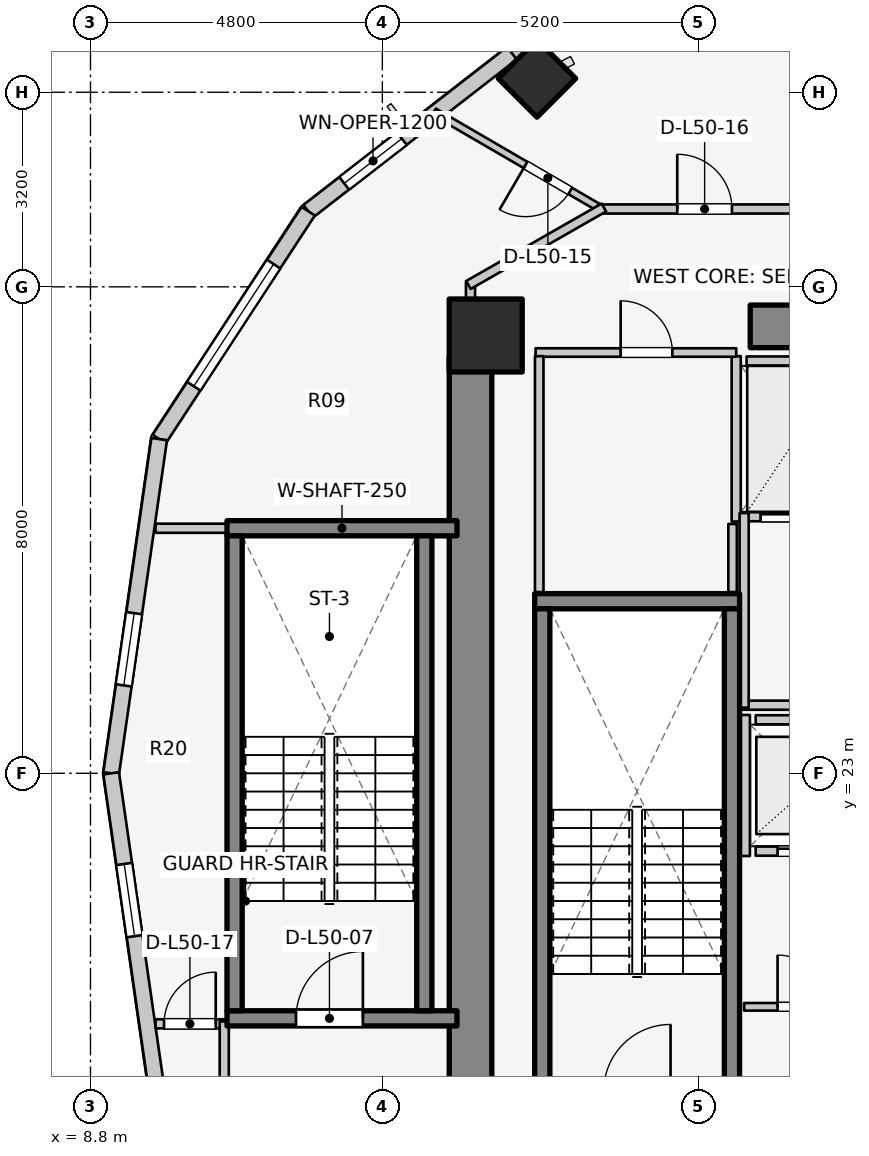
"""IFC4 building model, lengths in metres.
Left out: names, types, materials, properties, quantities, classifications, styles, units other than length and angle.
Written with IfcOpenShell. Run it as: python <this file> out.ifc"""

import sys

from ifc_helpers import new_model, si_unit, direction, frame, frame_2d, origin, origin_2d, place, context, subcontext, project, spatial, rectangle, extrude, element, fill, save


model = new_model("IFC4")
c1 = context("Model", 3, precision=1e-05, world=origin(), true_north=direction((0.0, 1.0)))
c2 = subcontext(c1, "Body", "Model", "MODEL_VIEW")
j1 = project(units=[si_unit("LENGTHUNIT", "METRE"), si_unit("PLANEANGLEUNIT", "RADIAN")], contexts=[c1])
p1 = place(None, origin())
s1 = spatial("IfcSite", under=j1, at=p1, CompositionType="ELEMENT")
p2 = place(p1, origin())
s2 = spatial("IfcBuilding", under=s1, at=p2, CompositionType="ELEMENT")
p3 = place(p2, frame((0.0, 0.0, 165.3)))
s3 = spatial("IfcBuildingStorey", under=s2, at=p3, CompositionType="ELEMENT", Elevation=165.3)
p4 = place(p3, frame((15.05, 17.05, 0.0), z_axis=(0.0, 0.0, 1.0), x_axis=(0.0, 1.0, 0.0)))
e1 = element("IfcWall", 1, at=p4, inside=s3, PredefinedType="SHEAR", context=c2, shape_type="SweptSolid", body=[
    extrude(rectangle(XDim=12.8, YDim=0.7, at=frame_2d((6.4, 0.0))), origin(), (0.0, 0.0, 1.0), 3.1),
])
p5 = place(p3, frame((19.65, 30.35, 0.0), z_axis=(0.0, 0.0, 1.0), x_axis=(1.0, 0.0, 0.0)))
e2 = element("IfcWall", 2, at=p5, inside=s3, PredefinedType="SHEAR", context=c2, shape_type="SweptSolid", body=[
    extrude(rectangle(XDim=4.5, YDim=0.7, at=frame_2d((2.25, 0.0))), origin(), (0.0, 0.0, 1.0), 3.1),
])
p6 = place(p3, frame((16.105, 25.83, 0.0), z_axis=(0.0, 0.0, 1.0), x_axis=(1.0, 0.0, 0.0)))
e3 = element("IfcWall", 3, at=p6, inside=s3, PredefinedType="SOLIDWALL", context=c2, shape_type="SweptSolid", body=[
    extrude(rectangle(XDim=3.37, YDim=0.25, at=frame_2d((1.685, 0.0))), origin(), (0.0, 0.0, 1.0), 3.1),
])
for number, where, z_axis, x_axis in (
    (4, (16.23, 17.895, 0.0), (0.0, 0.0, 1.0), (0.0, 1.0, 0.0)),
    (5, (19.35, 17.895, 0.0), (0.0, 0.0, 1.0), (0.0, 1.0, 0.0)),
):
    element("IfcWall", number, at=place(p3, frame(where, z_axis=z_axis, x_axis=x_axis)), inside=s3, PredefinedType="SOLIDWALL", context=c2, shape_type="SweptSolid", body=[
        extrude(rectangle(XDim=7.81, YDim=0.25, at=frame_2d((3.905, 0.0))), origin(), (0.0, 0.0, 1.0), 3.1),
    ])
p7 = place(p3, frame((11.045, 18.97, 0.0), z_axis=(0.0, 0.0, 1.0), x_axis=(1.0, 0.0, 0.0)))
e6 = element("IfcWall", 6, at=p7, inside=s3, PredefinedType="SOLIDWALL", context=c2, shape_type="SweptSolid", body=[
    extrude(rectangle(XDim=3.782, YDim=0.25, at=frame_2d((1.891, 0.0))), origin(), (0.0, 0.0, 1.0), 3.1),
])
p8 = place(p7, frame((1.135, 0.0, 0.0)))
e7 = element("IfcOpeningElement", 7, at=p8, cuts=e6, PredefinedType="OPENING", context=c2, shape_type="SweptSolid", body=[
    extrude(rectangle(XDim=1.1, YDim=2.1, at=frame_2d((0.55, 1.05))), frame((0.0, 0.135, 0.0), z_axis=(0.0, -1.0, 0.0), x_axis=(1.0, 0.0, 0.0)), (0.0, 0.0, 1.0), 0.27),
])
p9 = place(p3, frame((11.045, 27.03, 0.0), z_axis=(0.0, 0.0, 1.0), x_axis=(1.0, 0.0, 0.0)))
e8 = element("IfcWall", 8, at=p9, inside=s3, PredefinedType="SOLIDWALL", context=c2, shape_type="SweptSolid", body=[
    extrude(rectangle(XDim=3.782, YDim=0.25, at=frame_2d((1.891, 0.0))), origin(), (0.0, 0.0, 1.0), 3.1),
])
for number, where, z_axis, x_axis in (
    (9, (11.17, 19.095, 0.0), (0.0, 0.0, 1.0), (0.0, 1.0, 0.0)),
    (10, (14.29, 19.095, 0.0), (0.0, 0.0, 1.0), (0.0, 1.0, 0.0)),
):
    element("IfcWall", number, at=place(p3, frame(where, z_axis=z_axis, x_axis=x_axis)), inside=s3, PredefinedType="SOLIDWALL", context=c2, shape_type="SweptSolid", body=[
        extrude(rectangle(XDim=7.81, YDim=0.25, at=frame_2d((3.905, 0.0))), origin(), (0.0, 0.0, 1.0), 3.1),
    ])
p10 = place(p3, frame((15.3, 30.2, 0.0), z_axis=(0.0, 0.0, 1.0), x_axis=(1.0, 0.0, 0.0)))
e11 = element("IfcColumn", 11, at=p10, inside=s3, PredefinedType="COLUMN", context=c2, shape_type="SweptSolid", body=[
    extrude(rectangle(XDim=1.2, YDim=1.2, at=origin_2d()), origin(), (0.0, 0.0, 1.0), 3.1),
])
p11 = place(p3, frame((16.143, 34.427, 0.0), z_axis=(0.0, 0.0, 1.0), x_axis=(-0.707106781187, 0.707106781187, 0.0)))
e12 = element("IfcColumn", 12, at=p11, inside=s3, PredefinedType="COLUMN", context=c2, shape_type="SweptSolid", body=[
    extrude(rectangle(XDim=0.9, YDim=0.9, at=origin_2d()), origin(), (0.0, 0.0, 1.0), 3.1),
])
p12 = place(p3, frame((19.587, 36.863, 0.0), z_axis=(0.0, 0.0, 1.0), x_axis=(-0.885660265226, -0.464333818065, 0.0)))
e13 = element("IfcWall", 13, at=p12, inside=s3, PredefinedType="STANDARD", context=c2, shape_type="SweptSolid", body=[
    extrude(rectangle(XDim=4.354, YDim=0.26, at=frame_2d((2.177, 0.0))), origin(), (0.0, 0.0, 1.0), 2.85),
])
p13 = place(p3, frame((15.731, 34.842, 0.0), z_axis=(0.0, 0.0, 1.0), x_axis=(-0.790185650662, -0.612867552973, 0.0)))
e14 = element("IfcWall", 14, at=p13, inside=s3, PredefinedType="STANDARD", context=c2, shape_type="SweptSolid", body=[
    extrude(rectangle(XDim=4.239, YDim=0.26, at=frame_2d((2.12, 0.0))), origin(), (0.0, 0.0, 1.0), 2.85),
])
p14 = place(p13, frame((2.29, 0.0, 0.75)))
e15 = element("IfcOpeningElement", 15, at=p14, cuts=e14, PredefinedType="OPENING", context=c2, shape_type="SweptSolid", body=[
    extrude(rectangle(XDim=1.2, YDim=1.5, at=frame_2d((0.6, 0.75))), frame((0.0, 0.14, 0.0), z_axis=(0.0, -1.0, 0.0), x_axis=(1.0, 0.0, 0.0)), (0.0, 0.0, 1.0), 0.28),
])
p15 = place(p3, frame((12.381, 32.243, 0.0), z_axis=(0.0, 0.0, 1.0), x_axis=(-0.547456494366, -0.836834145322, 0.0)))
e16 = element("IfcWall", 16, at=p15, inside=s3, PredefinedType="STANDARD", context=c2, shape_type="SweptSolid", body=[
    extrude(rectangle(XDim=4.477, YDim=0.26, at=frame_2d((2.239, 0.0))), origin(), (0.0, 0.0, 1.0), 2.85),
])
p16 = place(p15, frame((1.039, 0.0, 0.75)))
e17 = element("IfcOpeningElement", 17, at=p16, cuts=e16, PredefinedType="OPENING", context=c2, shape_type="SweptSolid", body=[
    extrude(rectangle(XDim=2.4, YDim=1.7, at=frame_2d((1.2, 0.85))), frame((0.0, 0.14, 0.0), z_axis=(0.0, -1.0, 0.0), x_axis=(1.0, 0.0, 0.0)), (0.0, 0.0, 1.0), 0.28),
])
p17 = place(p3, frame((9.93, 28.497, 0.0), z_axis=(0.0, 0.0, 1.0), x_axis=(-0.142227632286, -0.989833976288, 0.0)))
e18 = element("IfcWall", 18, at=p17, inside=s3, PredefinedType="STANDARD", context=c2, shape_type="SweptSolid", body=[
    extrude(rectangle(XDim=5.553, YDim=0.26, at=frame_2d((2.776, 0.0))), origin(), (0.0, 0.0, 1.0), 2.85),
])
p18 = place(p17, frame((2.892, 0.0, 0.75)))
e19 = element("IfcOpeningElement", 19, at=p18, cuts=e18, PredefinedType="OPENING", context=c2, shape_type="SweptSolid", body=[
    extrude(rectangle(XDim=1.2, YDim=1.5, at=frame_2d((0.6, 0.75))), frame((0.0, 0.14, 0.0), z_axis=(0.0, -1.0, 0.0), x_axis=(1.0, 0.0, 0.0)), (0.0, 0.0, 1.0), 0.28),
])
p19 = place(p3, frame((9.14, 23.0, 0.0), z_axis=(0.0, 0.0, 1.0), x_axis=(0.142227632286, -0.989833976288, 0.0)))
e20 = element("IfcWall", 20, at=p19, inside=s3, PredefinedType="STANDARD", context=c2, shape_type="SweptSolid", body=[
    extrude(rectangle(XDim=5.553, YDim=0.26, at=frame_2d((2.776, 0.0))), origin(), (0.0, 0.0, 1.0), 2.85),
])
p20 = place(p19, frame((1.506, 0.0, 0.75)))
e21 = element("IfcOpeningElement", 21, at=p20, cuts=e20, PredefinedType="OPENING", context=c2, shape_type="SweptSolid", body=[
    extrude(rectangle(XDim=1.2, YDim=1.5, at=frame_2d((0.6, 0.75))), frame((0.0, 0.14, 0.0), z_axis=(0.0, -1.0, 0.0), x_axis=(1.0, 0.0, 0.0)), (0.0, 0.0, 1.0), 0.28),
])
p21 = place(p3, frame((19.74, 21.72, 0.0), z_axis=(0.0, 0.0, 1.0), x_axis=(1.0, 0.0, 0.0)))
e22 = element("IfcWall", 22, at=p21, inside=s3, PredefinedType="SOLIDWALL", context=c2, shape_type="SweptSolid", body=[
    extrude(rectangle(XDim=1.82, YDim=0.15, at=frame_2d((0.91, 0.0))), origin(), (0.0, 0.0, 1.0), 2.855),
])
p22 = place(p21, frame((0.36, 0.0, 0.0)))
e23 = element("IfcOpeningElement", 23, at=p22, cuts=e22, PredefinedType="OPENING", context=c2, shape_type="SweptSolid", body=[
    extrude(rectangle(XDim=1.1, YDim=2.1, at=frame_2d((0.55, 1.05))), frame((0.0, 0.085, 0.0), z_axis=(0.0, -1.0, 0.0), x_axis=(1.0, 0.0, 0.0)), (0.0, 0.0, 1.0), 0.17),
])
p23 = place(p3, frame((19.74, 23.88, 0.0), z_axis=(0.0, 0.0, 1.0), x_axis=(1.0, 0.0, 0.0)))
e24 = element("IfcWall", 24, at=p23, inside=s3, PredefinedType="SOLIDWALL", context=c2, shape_type="SweptSolid", body=[
    extrude(rectangle(XDim=1.82, YDim=0.15, at=frame_2d((0.91, 0.0))), origin(), (0.0, 0.0, 1.0), 2.855),
])
p24 = place(p3, frame((19.57, 21.64, 0.0), z_axis=(0.0, 0.0, 1.0), x_axis=(0.0, 1.0, 0.0)))
e25 = element("IfcWall", 25, at=p24, inside=s3, PredefinedType="SOLIDWALL", context=c2, shape_type="SweptSolid", body=[
    extrude(rectangle(XDim=2.32, YDim=0.15, at=frame_2d((1.16, 0.0))), origin(), (0.0, 0.0, 1.0), 2.855),
])
p25 = place(p3, frame((19.59, 27.22, 0.0), z_axis=(0.0, 0.0, 1.0), x_axis=(1.0, 0.0, 0.0)))
e26 = element("IfcWall", 26, at=p25, inside=s3, PredefinedType="SOLIDWALL", context=c2, shape_type="SweptSolid", body=[
    extrude(rectangle(XDim=1.76, YDim=0.15, at=frame_2d((0.88, 0.0))), origin(), (0.0, 0.0, 1.0), 2.855),
])
p26 = place(p25, frame((0.23, 0.0, 0.0)))
e27 = element("IfcOpeningElement", 27, at=p26, cuts=e26, PredefinedType="OPENING", context=c2, shape_type="SweptSolid", body=[
    extrude(rectangle(XDim=1.3, YDim=2.1, at=frame_2d((0.65, 1.05))), frame((0.0, 0.085, 0.0), z_axis=(0.0, -1.0, 0.0), x_axis=(1.0, 0.0, 0.0)), (0.0, 0.0, 1.0), 0.17),
])
p27 = place(p3, frame((19.59, 29.78, 0.0), z_axis=(0.0, 0.0, 1.0), x_axis=(1.0, 0.0, 0.0)))
e28 = element("IfcWall", 28, at=p27, inside=s3, PredefinedType="SOLIDWALL", context=c2, shape_type="SweptSolid", body=[
    extrude(rectangle(XDim=1.76, YDim=0.15, at=frame_2d((0.88, 0.0))), origin(), (0.0, 0.0, 1.0), 2.855),
])
p28 = place(p3, frame((19.42, 27.14, 0.0), z_axis=(0.0, 0.0, 1.0), x_axis=(0.0, 1.0, 0.0)))
e29 = element("IfcWall", 29, at=p28, inside=s3, PredefinedType="SOLIDWALL", context=c2, shape_type="SweptSolid", body=[
    extrude(rectangle(XDim=2.72, YDim=0.15, at=frame_2d((1.36, 0.0))), origin(), (0.0, 0.0, 1.0), 2.855),
])
p29 = place(p3, frame((19.52, 24.12, 0.0), z_axis=(0.0, 0.0, 1.0), x_axis=(1.0, 0.0, 0.0)))
e30 = element("IfcWall", 30, at=p29, inside=s3, PredefinedType="PARTITIONING", context=c2, shape_type="SweptSolid", body=[
    extrude(rectangle(XDim=5.08, YDim=0.15, at=frame_2d((2.54, 0.0))), origin(), (0.0, 0.0, 1.0), 2.12),
])
p30 = place(p3, frame((19.55, 24.08, 0.0), z_axis=(0.0, 0.0, 1.0), x_axis=(0.0, 1.0, 0.0)))
e31 = element("IfcWall", 31, at=p30, inside=s3, PredefinedType="PARTITIONING", context=c2, shape_type="SweptSolid", body=[
    extrude(rectangle(XDim=3.2, YDim=0.15, at=frame_2d((1.6, 0.0))), origin(), (0.0, 0.0, 1.0), 2.855),
])
p31 = place(p3, frame((19.55, 19.16, 0.0), z_axis=(0.0, 0.0, 1.0), x_axis=(1.0, 0.0, 0.0)))
e32 = element("IfcWall", 32, at=p31, inside=s3, PredefinedType="PARTITIONING", context=c2, shape_type="SweptSolid", body=[
    extrude(rectangle(XDim=4.87, YDim=0.125, at=frame_2d((2.435, 0.0))), origin(), (0.0, 0.0, 1.0), 2.12),
])
p32 = place(p31, frame((0.55, 0.0, 0.0)))
e33 = element("IfcOpeningElement", 33, at=p32, cuts=e32, PredefinedType="OPENING", context=c2, shape_type="SweptSolid", body=[
    extrude(rectangle(XDim=0.85, YDim=2.05, at=frame_2d((0.425, 1.025))), frame((0.0, 0.073, 0.0), z_axis=(0.0, -1.0, 0.0), x_axis=(1.0, 0.0, 0.0)), (0.0, 0.0, 1.0), 0.145),
])
p33 = place(p3, frame((16.12, 29.92, 0.0), z_axis=(0.0, 0.0, 1.0), x_axis=(1.0, 0.0, 0.0)))
e34 = element("IfcWall", 34, at=p33, inside=s3, PredefinedType="PLUMBINGWALL", context=c2, shape_type="SweptSolid", body=[
    extrude(rectangle(XDim=3.3, YDim=0.14, at=frame_2d((1.65, 0.0))), origin(), (0.0, 0.0, 1.0), 2.855),
])
p34 = place(p33, frame((1.399, 0.0, 0.0)))
e35 = element("IfcOpeningElement", 35, at=p34, cuts=e34, PredefinedType="OPENING", context=c2, shape_type="SweptSolid", body=[
    extrude(rectangle(XDim=0.85, YDim=2.05, at=frame_2d((0.425, 1.025))), frame((0.0, 0.08, 0.0), z_axis=(0.0, -1.0, 0.0), x_axis=(1.0, 0.0, 0.0)), (0.0, 0.0, 1.0), 0.16),
])
p35 = place(p3, frame((16.18, 25.98, 0.0), z_axis=(0.0, 0.0, 1.0), x_axis=(0.0, 1.0, 0.0)))
e36 = element("IfcWall", 36, at=p35, inside=s3, PredefinedType="PLUMBINGWALL", context=c2, shape_type="SweptSolid", body=[
    extrude(rectangle(XDim=3.88, YDim=0.14, at=frame_2d((1.94, 0.0))), origin(), (0.0, 0.0, 1.0), 2.855),
])
p36 = place(p3, frame((19.36, 25.98, 0.0), z_axis=(0.0, 0.0, 1.0), x_axis=(0.0, 1.0, 0.0)))
e37 = element("IfcWall", 37, at=p36, inside=s3, PredefinedType="PLUMBINGWALL", context=c2, shape_type="SweptSolid", body=[
    extrude(rectangle(XDim=1.12, YDim=0.14, at=frame_2d((0.56, 0.0))), origin(), (0.0, 0.0, 1.0), 2.855),
])
p37 = place(p3, frame((9.87, 27.03, 0.0), z_axis=(0.0, 0.0, 1.0), x_axis=(1.0, 0.0, 0.0)))
e38 = element("IfcWall", 38, at=p37, inside=s3, PredefinedType="PARTITIONING", context=c2, shape_type="SweptSolid", body=[
    extrude(rectangle(XDim=1.17, YDim=0.15, at=frame_2d((0.585, 0.0))), origin(), (0.0, 0.0, 1.0), 2.855),
])
p38 = place(p3, frame((15.05, 29.8, 0.0), z_axis=(0.0, 0.0, 1.0), x_axis=(0.0, 1.0, 0.0)))
e39 = element("IfcWall", 39, at=p38, inside=s3, PredefinedType="PARTITIONING", context=c2, shape_type="SweptSolid", body=[
    extrude(rectangle(XDim=1.29, YDim=0.15, at=frame_2d((0.645, 0.0))), origin(), (0.0, 0.0, 1.0), 2.855),
])
p39 = place(p3, frame((17.243, 32.255, 0.0), z_axis=(0.0, 0.0, 1.0), x_axis=(-0.864408655832, 0.502789892224, 0.0)))
e40 = element("IfcWall", 40, at=p39, inside=s3, PredefinedType="MOVABLE", context=c2, shape_type="SweptSolid", body=[
    extrude(rectangle(XDim=3.23, YDim=0.12, at=frame_2d((1.615, 0.0))), origin(), (0.0, 0.0, 1.0), 2.22),
])
p40 = place(p39, frame((0.641, 0.0, 0.0)))
e41 = element("IfcOpeningElement", 41, at=p40, cuts=e40, PredefinedType="OPENING", context=c2, shape_type="SweptSolid", body=[
    extrude(rectangle(XDim=0.85, YDim=2.05, at=frame_2d((0.425, 1.025))), frame((0.0, 0.07, 0.0), z_axis=(0.0, -1.0, 0.0), x_axis=(1.0, 0.0, 0.0)), (0.0, 0.0, 1.0), 0.14),
])
p41 = place(p3, frame((17.15, 32.28, 0.0), z_axis=(0.0, 0.0, 1.0), x_axis=(1.0, 0.0, 0.0)))
e42 = element("IfcWall", 42, at=p41, inside=s3, PredefinedType="PARTITIONING", context=c2, shape_type="SweptSolid", body=[
    extrude(rectangle(XDim=7.52, YDim=0.15, at=frame_2d((3.76, 0.0))), origin(), (0.0, 0.0, 1.0), 2.299),
])
p42 = place(p41, frame((1.3, 0.0, 0.0)))
e43 = element("IfcOpeningElement", 43, at=p42, cuts=e42, PredefinedType="OPENING", context=c2, shape_type="SweptSolid", body=[
    extrude(rectangle(XDim=0.9, YDim=2.1, at=frame_2d((0.45, 1.05))), frame((0.0, 0.085, 0.0), z_axis=(0.0, -1.0, 0.0), x_axis=(1.0, 0.0, 0.0)), (0.0, 0.0, 1.0), 0.17),
])
p43 = place(p3, frame((17.243, 32.305, 0.0), z_axis=(0.0, 0.0, 1.0), x_axis=(-0.867991349648, -0.496579315857, 0.0)))
e44 = element("IfcWall", 44, at=p43, inside=s3, PredefinedType="PARTITIONING", context=c2, shape_type="SweptSolid", body=[
    extrude(rectangle(XDim=2.567, YDim=0.15, at=frame_2d((1.283, 0.0))), origin(), (0.0, 0.0, 1.0), 2.22),
])
p44 = place(p3, frame((9.87, 18.88, 0.0), z_axis=(0.0, 0.0, 1.0), x_axis=(1.0, 0.0, 0.0)))
e45 = element("IfcWall", 45, at=p44, inside=s3, PredefinedType="PARTITIONING", context=c2, shape_type="SweptSolid", body=[
    extrude(rectangle(XDim=1.17, YDim=0.15, at=frame_2d((0.585, 0.0))), origin(), (0.0, 0.0, 1.0), 2.855),
])
p45 = place(p44, frame((0.14, 0.0, 0.0)))
e46 = element("IfcOpeningElement", 46, at=p45, cuts=e45, PredefinedType="OPENING", context=c2, shape_type="SweptSolid", body=[
    extrude(rectangle(XDim=0.85, YDim=2.05, at=frame_2d((0.425, 1.025))), frame((0.0, 0.085, 0.0), z_axis=(0.0, -1.0, 0.0), x_axis=(1.0, 0.0, 0.0)), (0.0, 0.0, 1.0), 0.17),
])
p46 = place(p3, frame((11.0, 15.91, 0.0), z_axis=(0.0, 0.0, 1.0), x_axis=(0.0, 1.0, 0.0)))
e47 = element("IfcWall", 47, at=p46, inside=s3, PredefinedType="PARTITIONING", context=c2, shape_type="SweptSolid", body=[
    extrude(rectangle(XDim=3.01, YDim=0.15, at=frame_2d((1.505, 0.0))), origin(), (0.0, 0.0, 1.0), 2.855),
])
p47 = place(p3, frame((26.12, 33.806, 0.0), z_axis=(0.0, 0.0, 1.0), x_axis=(-0.939901628116, 0.341445353557, 0.0)))
e48 = element("IfcWall", 48, at=p47, inside=s3, PredefinedType="PARTITIONING", context=c2, shape_type="SweptSolid", body=[
    extrude(rectangle(XDim=6.387, YDim=0.125, at=frame_2d((3.194, 0.0))), origin(), (0.0, 0.0, 1.0), 2.299),
])
p48 = place(p14, origin())
e49 = element("IfcWindow", 49, at=p48, inside=s3, PartitioningType="SINGLE_PANEL", PredefinedType="WINDOW", context=c2, shape_type="SweptSolid", body=[
    extrude(rectangle(XDim=1.2, YDim=1.5, at=frame_2d((0.6, 0.75))), frame((0.0, 0.03, 0.0), z_axis=(0.0, -1.0, 0.0), x_axis=(1.0, 0.0, 0.0)), (0.0, 0.0, 1.0), 0.06),
])
fill(e15, e49)
p49 = place(p16, origin())
e50 = element("IfcWindow", 50, at=p49, inside=s3, PartitioningType="SINGLE_PANEL", PredefinedType="WINDOW", context=c2, shape_type="SweptSolid", body=[
    extrude(rectangle(XDim=2.4, YDim=1.7, at=frame_2d((1.2, 0.85))), frame((0.0, 0.03, 0.0), z_axis=(0.0, -1.0, 0.0), x_axis=(1.0, 0.0, 0.0)), (0.0, 0.0, 1.0), 0.06),
])
fill(e17, e50)
p50 = place(p18, origin())
e51 = element("IfcWindow", 51, at=p50, inside=s3, PartitioningType="SINGLE_PANEL", PredefinedType="WINDOW", context=c2, shape_type="SweptSolid", body=[
    extrude(rectangle(XDim=1.2, YDim=1.5, at=frame_2d((0.6, 0.75))), frame((0.0, 0.03, 0.0), z_axis=(0.0, -1.0, 0.0), x_axis=(1.0, 0.0, 0.0)), (0.0, 0.0, 1.0), 0.06),
])
fill(e19, e51)
p51 = place(p20, origin())
e52 = element("IfcWindow", 52, at=p51, inside=s3, PartitioningType="SINGLE_PANEL", PredefinedType="WINDOW", context=c2, shape_type="SweptSolid", body=[
    extrude(rectangle(XDim=1.2, YDim=1.5, at=frame_2d((0.6, 0.75))), frame((0.0, 0.03, 0.0), z_axis=(0.0, -1.0, 0.0), x_axis=(1.0, 0.0, 0.0)), (0.0, 0.0, 1.0), 0.06),
])
fill(e21, e52)
p52 = place(p8, origin())
e53 = element("IfcDoor", 53, at=p52, inside=s3, OperationType="SINGLE_SWING_RIGHT", PredefinedType="DOOR", context=c2, shape_type="SweptSolid", body=[
    extrude(rectangle(XDim=1.1, YDim=2.1, at=frame_2d((0.55, 1.05))), frame((0.0, 0.025, 0.0), z_axis=(0.0, -1.0, 0.0), x_axis=(1.0, 0.0, 0.0)), (0.0, 0.0, 1.0), 0.05),
])
fill(e7, e53)
p53 = place(p22, origin())
e54 = element("IfcDoor", 54, at=p53, inside=s3, OperationType="DOUBLE_DOOR_SLIDING", PredefinedType="DOOR", context=c2, shape_type="SweptSolid", body=[
    extrude(rectangle(XDim=1.1, YDim=2.1, at=frame_2d((0.55, 1.05))), frame((0.0, 0.025, 0.0), z_axis=(0.0, -1.0, 0.0), x_axis=(1.0, 0.0, 0.0)), (0.0, 0.0, 1.0), 0.05),
])
fill(e23, e54)
p54 = place(p26, origin())
e55 = element("IfcDoor", 55, at=p54, inside=s3, OperationType="DOUBLE_DOOR_SLIDING", PredefinedType="DOOR", context=c2, shape_type="SweptSolid", body=[
    extrude(rectangle(XDim=1.3, YDim=2.1, at=frame_2d((0.65, 1.05))), frame((0.0, 0.025, 0.0), z_axis=(0.0, -1.0, 0.0), x_axis=(1.0, 0.0, 0.0)), (0.0, 0.0, 1.0), 0.05),
])
fill(e27, e55)
p55 = place(p32, origin())
e56 = element("IfcDoor", 56, at=p55, inside=s3, OperationType="SINGLE_SWING_LEFT", PredefinedType="DOOR", context=c2, shape_type="SweptSolid", body=[
    extrude(rectangle(XDim=0.85, YDim=2.05, at=frame_2d((0.425, 1.025))), frame((0.0, 0.025, 0.0), z_axis=(0.0, -1.0, 0.0), x_axis=(1.0, 0.0, 0.0)), (0.0, 0.0, 1.0), 0.05),
])
fill(e33, e56)
p56 = place(p34, origin())
e57 = element("IfcDoor", 57, at=p56, inside=s3, OperationType="SINGLE_SWING_LEFT", PredefinedType="DOOR", context=c2, shape_type="SweptSolid", body=[
    extrude(rectangle(XDim=0.85, YDim=2.05, at=frame_2d((0.425, 1.025))), frame((0.0, 0.025, 0.0), z_axis=(0.0, -1.0, 0.0), x_axis=(1.0, 0.0, 0.0)), (0.0, 0.0, 1.0), 0.05),
])
fill(e35, e57)
p57 = place(p40, origin())
e58 = element("IfcDoor", 58, at=p57, inside=s3, OperationType="SINGLE_SWING_RIGHT", PredefinedType="DOOR", context=c2, shape_type="SweptSolid", body=[
    extrude(rectangle(XDim=0.85, YDim=2.05, at=frame_2d((0.425, 1.025))), frame((0.0, 0.025, 0.0), z_axis=(0.0, -1.0, 0.0), x_axis=(1.0, 0.0, 0.0)), (0.0, 0.0, 1.0), 0.05),
])
fill(e41, e58)
p58 = place(p42, origin())
e59 = element("IfcDoor", 59, at=p58, inside=s3, OperationType="SINGLE_SWING_LEFT", PredefinedType="DOOR", context=c2, shape_type="SweptSolid", body=[
    extrude(rectangle(XDim=0.9, YDim=2.1, at=frame_2d((0.45, 1.05))), frame((0.0, 0.025, 0.0), z_axis=(0.0, -1.0, 0.0), x_axis=(1.0, 0.0, 0.0)), (0.0, 0.0, 1.0), 0.05),
])
fill(e43, e59)
p59 = place(p45, origin())
e60 = element("IfcDoor", 60, at=p59, inside=s3, OperationType="SINGLE_SWING_RIGHT", PredefinedType="DOOR", context=c2, shape_type="SweptSolid", body=[
    extrude(rectangle(XDim=0.85, YDim=2.05, at=frame_2d((0.425, 1.025))), frame((0.0, 0.025, 0.0), z_axis=(0.0, -1.0, 0.0), x_axis=(1.0, 0.0, 0.0)), (0.0, 0.0, 1.0), 0.05),
])
fill(e46, e60)
save(model, sys.argv[1])
